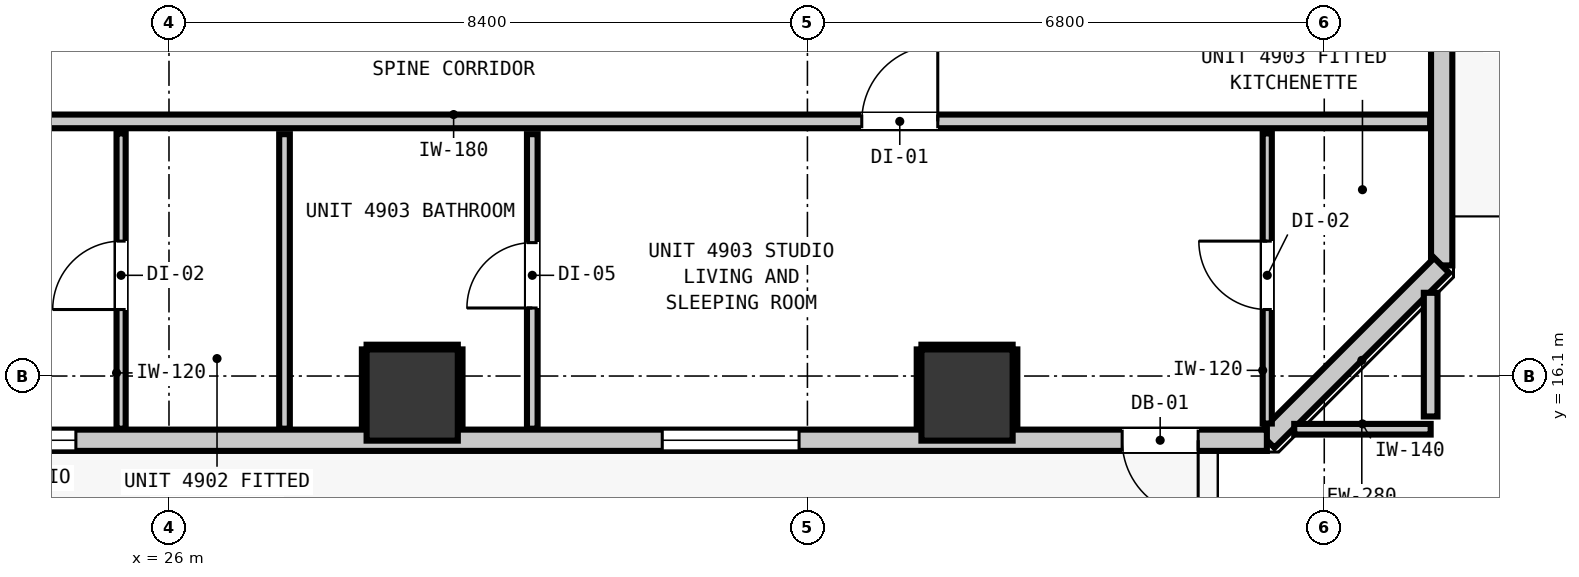
"""IFC4 building model, lengths in metres.
Left out: names, types, materials, properties, quantities, classifications, styles, units other than length and angle.
Written with IfcOpenShell. Run it as: python <this file> out.ifc"""

import sys

from ifc_helpers import new_model, si_unit, direction, frame, frame_2d, origin, origin_2d, place, context, subcontext, project, spatial, rectangle, extrude, element, fill, save


model = new_model("IFC4")
c1 = context("Model", 3, precision=1e-05, world=origin(), true_north=direction((0.0, 1.0)))
c2 = subcontext(c1, "Body", "Model", "MODEL_VIEW")
j1 = project(units=[si_unit("LENGTHUNIT", "METRE"), si_unit("PLANEANGLEUNIT", "RADIAN")], contexts=[c1])
p1 = place(None, origin())
s1 = spatial("IfcSite", under=j1, at=p1, CompositionType="ELEMENT")
p2 = place(p1, origin())
s2 = spatial("IfcBuilding", under=s1, at=p2, CompositionType="ELEMENT")
p3 = place(p2, frame((0.0, 0.0, 169.16)))
s3 = spatial("IfcBuildingStorey", under=s2, at=p3, CompositionType="ELEMENT", Elevation=169.16)
for number, where, z_axis, x_axis in (
    (1, (29.2, 15.85, 0.0), (0.0, 0.0, 1.0), (1.0, 0.0, 0.0)),
    (2, (36.5, 15.85, 0.0), (0.0, 0.0, 1.0), (1.0, 0.0, 0.0)),
):
    element("IfcColumn", number, at=place(p3, frame(where, z_axis=z_axis, x_axis=x_axis)), inside=s3, PredefinedType="COLUMN", context=c2, shape_type="SweptSolid", body=[
        extrude(rectangle(XDim=1.2, YDim=1.2, at=origin_2d()), origin(), (0.0, 0.0, 1.0), 3.32),
    ])
p4 = place(p3, frame((42.745, 49.845, 0.0), z_axis=(0.0, 0.0, 1.0), x_axis=(0.0, -1.0, 0.0)))
e3 = element("IfcWall", 3, at=p4, inside=s3, PredefinedType="STANDARD", context=c2, shape_type="SweptSolid", body=[
    extrude(rectangle(XDim=32.29, YDim=0.28, at=frame_2d((16.145, 0.0))), origin(), (0.0, 0.0, 1.0), 2.96),
])
p5 = place(p4, frame((0.904, 0.0, 0.0)))
e4 = element("IfcOpeningElement", 4, at=p5, cuts=e3, PredefinedType="OPENING", context=c2, shape_type="SweptSolid", body=[
    extrude(rectangle(XDim=1.0, YDim=2.15, at=frame_2d((0.5, 1.075))), frame((0.0, 0.15, 0.0), z_axis=(0.0, -1.0, 0.0), x_axis=(1.0, 0.0, 0.0)), (0.0, 0.0, 1.0), 0.3),
])
p6 = place(p4, frame((2.699, 0.0, 0.85)))
e5 = element("IfcOpeningElement", 5, at=p6, cuts=e3, PredefinedType="OPENING", context=c2, shape_type="SweptSolid", body=[
    extrude(rectangle(XDim=1.8, YDim=1.9, at=frame_2d((0.9, 0.95))), frame((0.0, 0.15, 0.0), z_axis=(0.0, -1.0, 0.0), x_axis=(1.0, 0.0, 0.0)), (0.0, 0.0, 1.0), 0.3),
])
p7 = place(p4, frame((23.02, 0.0, 0.85)))
e6 = element("IfcOpeningElement", 6, at=p7, cuts=e3, PredefinedType="OPENING", context=c2, shape_type="SweptSolid", body=[
    extrude(rectangle(XDim=1.8, YDim=1.9, at=frame_2d((0.9, 0.95))), frame((0.0, 0.15, 0.0), z_axis=(0.0, -1.0, 0.0), x_axis=(1.0, 0.0, 0.0)), (0.0, 0.0, 1.0), 0.3),
])
p8 = place(p4, frame((13.47, 0.0, 0.85)))
e7 = element("IfcOpeningElement", 7, at=p8, cuts=e3, PredefinedType="OPENING", context=c2, shape_type="SweptSolid", body=[
    extrude(rectangle(XDim=1.8, YDim=1.9, at=frame_2d((0.9, 0.95))), frame((0.0, 0.15, 0.0), z_axis=(0.0, -1.0, 0.0), x_axis=(1.0, 0.0, 0.0)), (0.0, 0.0, 1.0), 0.3),
])
p9 = place(p3, frame((42.745, 17.555, 0.0), z_axis=(0.0, 0.0, 1.0), x_axis=(-0.707106781187, -0.707106781187, 0.0)))
e8 = element("IfcWall", 8, at=p9, inside=s3, PredefinedType="STANDARD", context=c2, shape_type="SweptSolid", body=[
    extrude(rectangle(XDim=3.253, YDim=0.28, at=frame_2d((1.626, 0.0))), origin(), (0.0, 0.0, 1.0), 2.96),
])
p10 = place(p3, frame((40.445, 15.255, 0.0), z_axis=(0.0, 0.0, 1.0), x_axis=(-1.0, 0.0, 0.0)))
e9 = element("IfcWall", 9, at=p10, inside=s3, PredefinedType="STANDARD", context=c2, shape_type="SweptSolid", body=[
    extrude(rectangle(XDim=35.09, YDim=0.28, at=frame_2d((17.545, 0.0))), origin(), (0.0, 0.0, 1.0), 2.96),
])
p11 = place(p10, frame((0.904, 0.0, 0.0)))
e10 = element("IfcOpeningElement", 10, at=p11, cuts=e9, PredefinedType="OPENING", context=c2, shape_type="SweptSolid", body=[
    extrude(rectangle(XDim=1.0, YDim=2.15, at=frame_2d((0.5, 1.075))), frame((0.0, 0.15, 0.0), z_axis=(0.0, -1.0, 0.0), x_axis=(1.0, 0.0, 0.0)), (0.0, 0.0, 1.0), 0.3),
])
p12 = place(p10, frame((30.423, 0.0, 0.85)))
e11 = element("IfcOpeningElement", 11, at=p12, cuts=e9, PredefinedType="OPENING", context=c2, shape_type="SweptSolid", body=[
    extrude(rectangle(XDim=1.8, YDim=1.9, at=frame_2d((0.9, 0.95))), frame((0.0, 0.15, 0.0), z_axis=(0.0, -1.0, 0.0), x_axis=(1.0, 0.0, 0.0)), (0.0, 0.0, 1.0), 0.3),
])
p13 = place(p10, frame((15.67, 0.0, 0.85)))
e12 = element("IfcOpeningElement", 12, at=p13, cuts=e9, PredefinedType="OPENING", context=c2, shape_type="SweptSolid", body=[
    extrude(rectangle(XDim=1.8, YDim=1.9, at=frame_2d((0.9, 0.95))), frame((0.0, 0.15, 0.0), z_axis=(0.0, -1.0, 0.0), x_axis=(1.0, 0.0, 0.0)), (0.0, 0.0, 1.0), 0.3),
])
p14 = place(p10, frame((6.155, 0.0, 0.85)))
e13 = element("IfcOpeningElement", 13, at=p14, cuts=e9, PredefinedType="OPENING", context=c2, shape_type="SweptSolid", body=[
    extrude(rectangle(XDim=1.8, YDim=1.9, at=frame_2d((0.9, 0.95))), frame((0.0, 0.15, 0.0), z_axis=(0.0, -1.0, 0.0), x_axis=(1.0, 0.0, 0.0)), (0.0, 0.0, 1.0), 0.3),
])
p15 = place(p3, frame((12.983, 19.45, 0.0), z_axis=(0.0, 0.0, 1.0), x_axis=(1.0, 0.0, 0.0)))
e14 = element("IfcWall", 14, at=p15, inside=s3, PredefinedType="PARTITIONING", context=c2, shape_type="SweptSolid", body=[
    extrude(rectangle(XDim=29.61, YDim=0.18, at=frame_2d((14.805, 0.0))), origin(), (0.0, 0.0, 1.0), 2.96),
])
p16 = place(p15, frame((10.392, 0.0, 0.0)))
e15 = element("IfcOpeningElement", 15, at=p16, cuts=e14, PredefinedType="OPENING", context=c2, shape_type="SweptSolid", body=[
    extrude(rectangle(XDim=1.0, YDim=2.15, at=frame_2d((0.5, 1.075))), frame((0.0, 0.1, 0.0), z_axis=(0.0, -1.0, 0.0), x_axis=(1.0, 0.0, 0.0)), (0.0, 0.0, 1.0), 0.2),
])
p17 = place(p15, frame((22.132, 0.0, 0.0)))
e16 = element("IfcOpeningElement", 16, at=p17, cuts=e14, PredefinedType="OPENING", context=c2, shape_type="SweptSolid", body=[
    extrude(rectangle(XDim=1.0, YDim=2.15, at=frame_2d((0.5, 1.075))), frame((0.0, 0.1, 0.0), z_axis=(0.0, -1.0, 0.0), x_axis=(1.0, 0.0, 0.0)), (0.0, 0.0, 1.0), 0.2),
])
p18 = place(p3, frame((40.805, 15.4, 0.0), z_axis=(0.0, 0.0, 1.0), x_axis=(1.0, 0.0, 0.0)))
e17 = element("IfcWall", 17, at=p18, inside=s3, PredefinedType="PARTITIONING", context=c2, shape_type="SweptSolid", body=[
    extrude(rectangle(XDim=1.795, YDim=0.14, at=frame_2d((0.897, 0.0))), origin(), (0.0, 0.0, 1.0), 2.96),
])
p19 = place(p3, frame((42.6, 15.568, 0.0), z_axis=(0.0, 0.0, 1.0), x_axis=(0.0, 1.0, 0.0)))
e18 = element("IfcWall", 18, at=p19, inside=s3, PredefinedType="PARTITIONING", context=c2, shape_type="SweptSolid", body=[
    extrude(rectangle(XDim=1.627, YDim=0.18, at=frame_2d((0.813, 0.0))), origin(), (0.0, 0.0, 1.0), 2.96),
])
p20 = place(p3, frame((27.52, 15.407, 0.0), z_axis=(0.0, 0.0, 1.0), x_axis=(0.0, 1.0, 0.0)))
e19 = element("IfcWall", 19, at=p20, inside=s3, PredefinedType="PARTITIONING", context=c2, shape_type="SweptSolid", body=[
    extrude(rectangle(XDim=3.875, YDim=0.14, at=frame_2d((1.938, 0.0))), origin(), (0.0, 0.0, 1.0), 2.96),
])
p21 = place(p3, frame((30.78, 15.407, 0.0), z_axis=(0.0, 0.0, 1.0), x_axis=(0.0, 1.0, 0.0)))
e20 = element("IfcWall", 20, at=p21, inside=s3, PredefinedType="PARTITIONING", context=c2, shape_type="SweptSolid", body=[
    extrude(rectangle(XDim=3.875, YDim=0.14, at=frame_2d((1.938, 0.0))), origin(), (0.0, 0.0, 1.0), 2.96),
])
p22 = place(p21, frame((1.588, 0.0, 0.0)))
e21 = element("IfcOpeningElement", 21, at=p22, cuts=e20, PredefinedType="OPENING", context=c2, shape_type="SweptSolid", body=[
    extrude(rectangle(XDim=0.86, YDim=2.02, at=frame_2d((0.43, 1.01))), frame((0.0, 0.08, 0.0), z_axis=(0.0, -1.0, 0.0), x_axis=(1.0, 0.0, 0.0)), (0.0, 0.0, 1.0), 0.16),
])
p23 = place(p3, frame((25.37, 15.407, 0.0), z_axis=(0.0, 0.0, 1.0), x_axis=(0.0, 1.0, 0.0)))
e22 = element("IfcWall", 22, at=p23, inside=s3, PredefinedType="PARTITIONING", context=c2, shape_type="SweptSolid", body=[
    extrude(rectangle(XDim=3.885, YDim=0.12, at=frame_2d((1.942, 0.0))), origin(), (0.0, 0.0, 1.0), 2.96),
])
p24 = place(p23, frame((1.568, 0.0, 0.0)))
e23 = element("IfcOpeningElement", 23, at=p24, cuts=e22, PredefinedType="OPENING", context=c2, shape_type="SweptSolid", body=[
    extrude(rectangle(XDim=0.9, YDim=2.1, at=frame_2d((0.45, 1.05))), frame((0.0, 0.07, 0.0), z_axis=(0.0, -1.0, 0.0), x_axis=(1.0, 0.0, 0.0)), (0.0, 0.0, 1.0), 0.14),
])
p25 = place(p3, frame((40.45, 15.475, 0.0), z_axis=(0.0, 0.0, 1.0), x_axis=(0.0, 1.0, 0.0)))
e24 = element("IfcWall", 24, at=p25, inside=s3, PredefinedType="PARTITIONING", context=c2, shape_type="SweptSolid", body=[
    extrude(rectangle(XDim=3.817, YDim=0.12, at=frame_2d((1.908, 0.0))), origin(), (0.0, 0.0, 1.0), 2.96),
])
p26 = place(p25, frame((1.5, 0.0, 0.0)))
e25 = element("IfcOpeningElement", 25, at=p26, cuts=e24, PredefinedType="OPENING", context=c2, shape_type="SweptSolid", body=[
    extrude(rectangle(XDim=0.9, YDim=2.1, at=frame_2d((0.45, 1.05))), frame((0.0, 0.07, 0.0), z_axis=(0.0, -1.0, 0.0), x_axis=(1.0, 0.0, 0.0)), (0.0, 0.0, 1.0), 0.14),
])
p27 = place(p3, frame((28.6, 16.482, 0.0), z_axis=(0.0, 0.0, 1.0), x_axis=(1.0, 0.0, 0.0)))
e26 = element("IfcWall", 26, at=p27, inside=s3, PredefinedType="PARTITIONING", context=c2, shape_type="SweptSolid", body=[
    extrude(rectangle(XDim=1.2, YDim=0.06, at=frame_2d((0.6, 0.0))), origin(), (0.0, 0.0, 1.0), 1.45),
])
for number, where, z_axis, x_axis in (
    (27, (28.568, 15.41, 0.0), (0.0, 0.0, 1.0), (0.0, 1.0, 0.0)),
    (28, (29.832, 15.41, 0.0), (0.0, 0.0, 1.0), (0.0, 1.0, 0.0)),
):
    element("IfcWall", number, at=place(p3, frame(where, z_axis=z_axis, x_axis=x_axis)), inside=s3, PredefinedType="PARTITIONING", context=c2, shape_type="SweptSolid", body=[
        extrude(rectangle(XDim=1.04, YDim=0.06, at=frame_2d((0.52, 0.0))), origin(), (0.0, 0.0, 1.0), 1.45),
    ])
p28 = place(p3, frame((35.9, 16.482, 0.0), z_axis=(0.0, 0.0, 1.0), x_axis=(1.0, 0.0, 0.0)))
e29 = element("IfcWall", 29, at=p28, inside=s3, PredefinedType="PARTITIONING", context=c2, shape_type="SweptSolid", body=[
    extrude(rectangle(XDim=1.2, YDim=0.06, at=frame_2d((0.6, 0.0))), origin(), (0.0, 0.0, 1.0), 1.45),
])
for number, where, z_axis, x_axis in (
    (30, (35.868, 15.41, 0.0), (0.0, 0.0, 1.0), (0.0, 1.0, 0.0)),
    (31, (37.132, 15.41, 0.0), (0.0, 0.0, 1.0), (0.0, 1.0, 0.0)),
):
    element("IfcWall", number, at=place(p3, frame(where, z_axis=z_axis, x_axis=x_axis)), inside=s3, PredefinedType="PARTITIONING", context=c2, shape_type="SweptSolid", body=[
        extrude(rectangle(XDim=1.04, YDim=0.06, at=frame_2d((0.52, 0.0))), origin(), (0.0, 0.0, 1.0), 1.45),
    ])
p29 = place(p11, origin())
e32 = element("IfcDoor", 32, at=p29, inside=s3, OperationType="SINGLE_SWING_LEFT", PredefinedType="DOOR", context=c2, shape_type="SweptSolid", body=[
    extrude(rectangle(XDim=1.0, YDim=2.15, at=frame_2d((0.5, 1.075))), frame((0.0, 0.025, 0.0), z_axis=(0.0, -1.0, 0.0), x_axis=(1.0, 0.0, 0.0)), (0.0, 0.0, 1.0), 0.05),
])
fill(e10, e32)
p30 = place(p13, origin())
e33 = element("IfcWindow", 33, at=p30, inside=s3, PartitioningType="SINGLE_PANEL", PredefinedType="WINDOW", context=c2, shape_type="SweptSolid", body=[
    extrude(rectangle(XDim=1.8, YDim=1.9, at=frame_2d((0.9, 0.95))), frame((0.0, 0.03, 0.0), z_axis=(0.0, -1.0, 0.0), x_axis=(1.0, 0.0, 0.0)), (0.0, 0.0, 1.0), 0.06),
])
fill(e12, e33)
p31 = place(p14, origin())
e34 = element("IfcWindow", 34, at=p31, inside=s3, PartitioningType="SINGLE_PANEL", PredefinedType="WINDOW", context=c2, shape_type="SweptSolid", body=[
    extrude(rectangle(XDim=1.8, YDim=1.9, at=frame_2d((0.9, 0.95))), frame((0.0, 0.03, 0.0), z_axis=(0.0, -1.0, 0.0), x_axis=(1.0, 0.0, 0.0)), (0.0, 0.0, 1.0), 0.06),
])
fill(e13, e34)
p32 = place(p24, origin())
e35 = element("IfcDoor", 35, at=p32, inside=s3, OperationType="SINGLE_SWING_LEFT", PredefinedType="DOOR", context=c2, shape_type="SweptSolid", body=[
    extrude(rectangle(XDim=0.9, YDim=2.1, at=frame_2d((0.45, 1.05))), frame((0.0, 0.025, 0.0), z_axis=(0.0, -1.0, 0.0), x_axis=(1.0, 0.0, 0.0)), (0.0, 0.0, 1.0), 0.05),
])
fill(e23, e35)
p33 = place(p17, origin())
e36 = element("IfcDoor", 36, at=p33, inside=s3, OperationType="SINGLE_SWING_RIGHT", PredefinedType="DOOR", context=c2, shape_type="SweptSolid", body=[
    extrude(rectangle(XDim=1.0, YDim=2.15, at=frame_2d((0.5, 1.075))), frame((0.0, 0.025, 0.0), z_axis=(0.0, -1.0, 0.0), x_axis=(1.0, 0.0, 0.0)), (0.0, 0.0, 1.0), 0.05),
])
fill(e16, e36)
p34 = place(p22, origin())
e37 = element("IfcDoor", 37, at=p34, inside=s3, OperationType="SINGLE_SWING_LEFT", PredefinedType="DOOR", context=c2, shape_type="SweptSolid", body=[
    extrude(rectangle(XDim=0.86, YDim=2.02, at=frame_2d((0.43, 1.01))), frame((0.0, 0.025, 0.0), z_axis=(0.0, -1.0, 0.0), x_axis=(1.0, 0.0, 0.0)), (0.0, 0.0, 1.0), 0.05),
])
fill(e21, e37)
p35 = place(p26, origin())
e38 = element("IfcDoor", 38, at=p35, inside=s3, OperationType="SINGLE_SWING_RIGHT", PredefinedType="DOOR", context=c2, shape_type="SweptSolid", body=[
    extrude(rectangle(XDim=0.9, YDim=2.1, at=frame_2d((0.45, 1.05))), frame((0.0, 0.025, 0.0), z_axis=(0.0, -1.0, 0.0), x_axis=(1.0, 0.0, 0.0)), (0.0, 0.0, 1.0), 0.05),
])
fill(e25, e38)
save(model, sys.argv[1])
